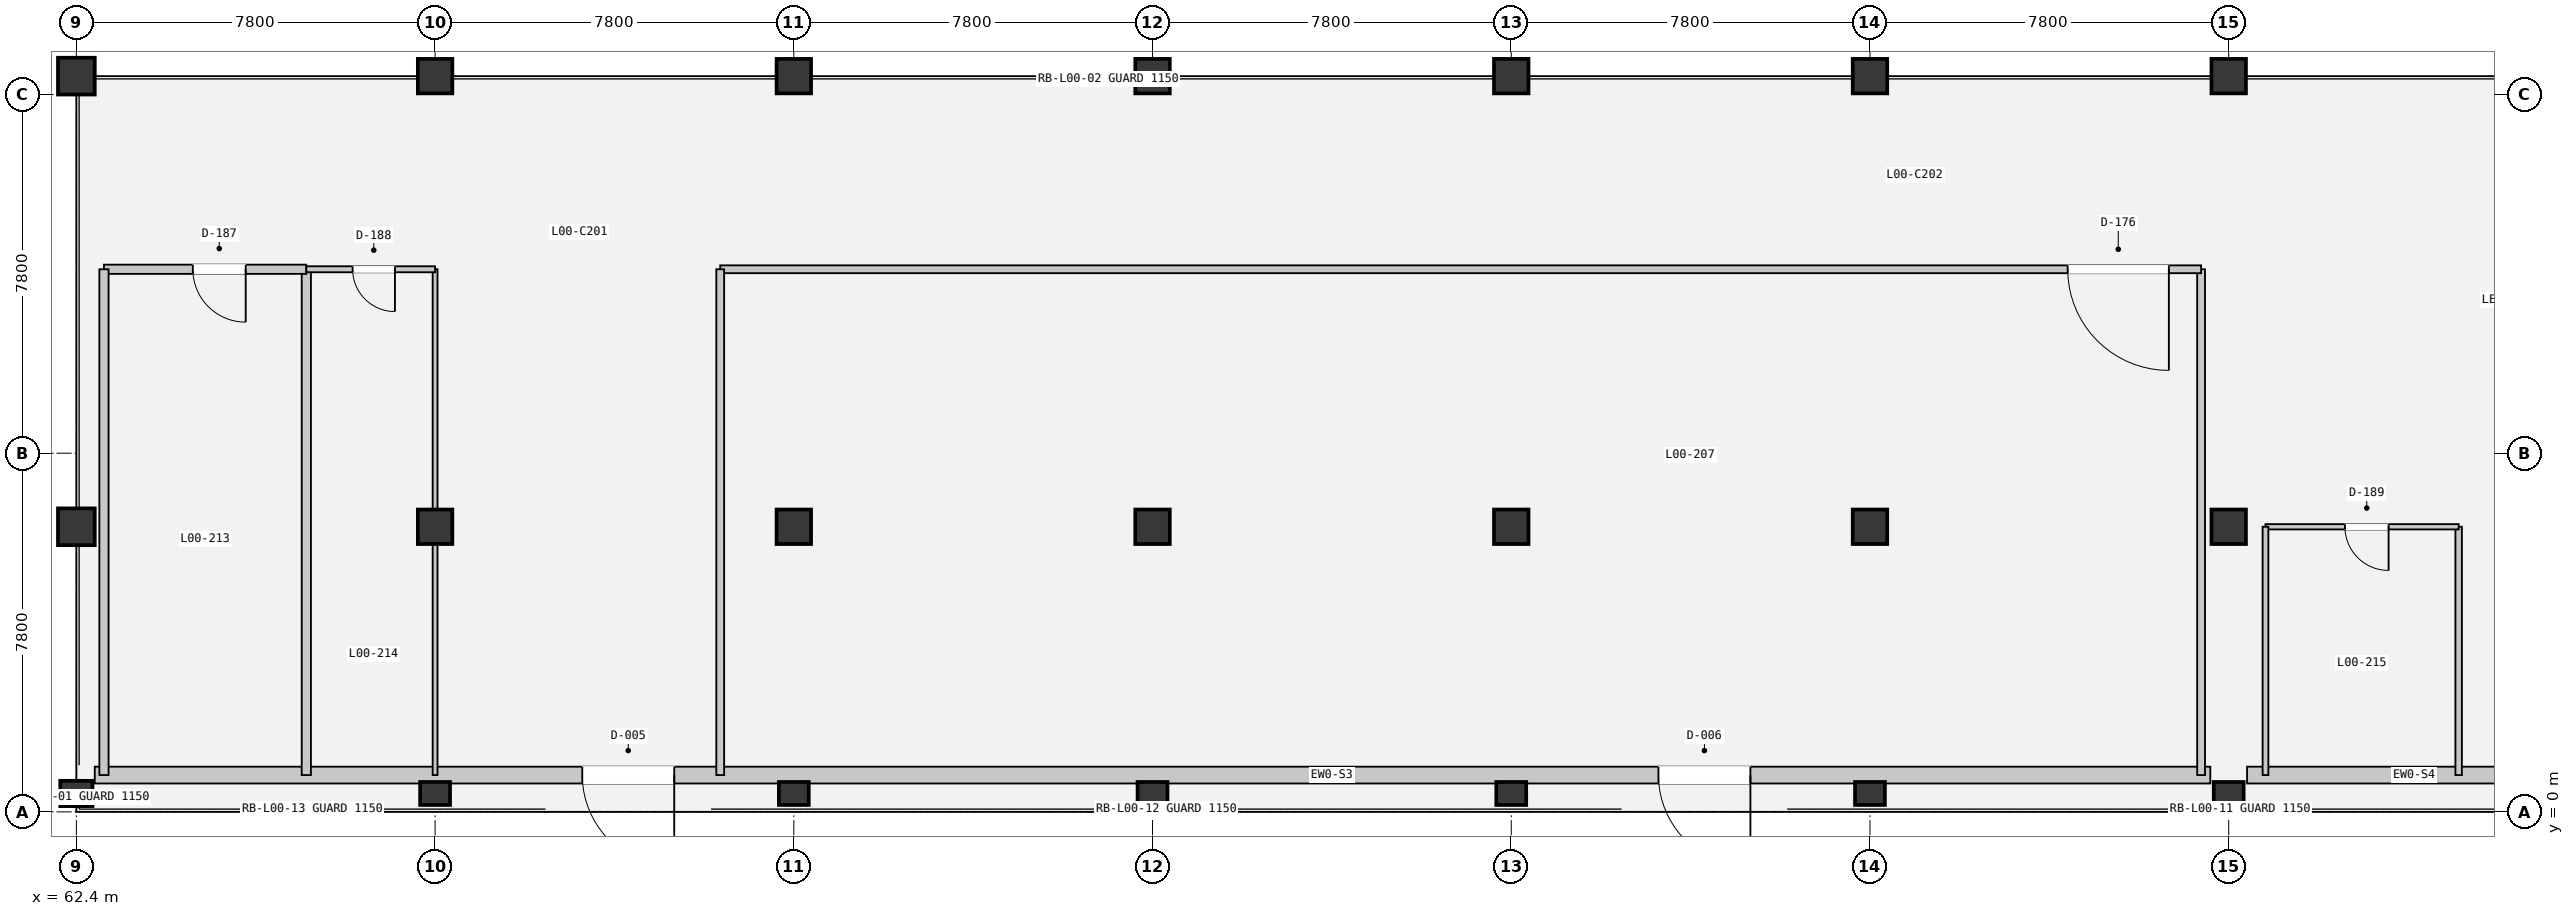
"""IFC4 building model, lengths in metres.
Left out: names, types, materials, properties, quantities, classifications, styles, units other than length and angle.
Written with IfcOpenShell. Run it as: python <this file> out.ifc"""

import sys

from ifc_helpers import new_model, si_unit, direction, frame, frame_2d, origin, origin_2d, place, context, subcontext, project, spatial, rectangle, extrude, element, fill, save


model = new_model("IFC4")
c1 = context("Model", 3, precision=1e-05, world=origin(), true_north=direction((0.0, 1.0)))
c2 = subcontext(c1, "Body", "Model", "MODEL_VIEW")
j1 = project(units=[si_unit("LENGTHUNIT", "METRE"), si_unit("PLANEANGLEUNIT", "RADIAN")], contexts=[c1])
p1 = place(None, origin())
s1 = spatial("IfcSite", under=j1, at=p1, CompositionType="ELEMENT")
p2 = place(p1, origin())
s2 = spatial("IfcBuilding", under=s1, at=p2, CompositionType="ELEMENT")
p3 = place(p2, origin())
s3 = spatial("IfcBuildingStorey", under=s2, at=p3, CompositionType="ELEMENT", Elevation=0.0)
p4 = place(p3, frame((62.4, 0.4, 0.0), z_axis=(0.0, 0.0, 1.0), x_axis=(1.0, 0.0, 0.0)))
e1 = element("IfcColumn", 1, at=p4, inside=s3, PredefinedType="COLUMN", context=c2, shape_type="SweptSolid", body=[
    extrude(rectangle(XDim=0.7, YDim=0.55, at=origin_2d()), origin(), (0.0, 0.0, 1.0), 5.4),
])
for number, where, z_axis, x_axis in (
    (2, (62.4, 6.2, 0.0), (0.0, 0.0, 1.0), (1.0, 0.0, 0.0)),
    (3, (62.4, 16.0, 0.0), (0.0, 0.0, 1.0), (1.0, 0.0, 0.0)),
):
    element("IfcColumn", number, at=place(p3, frame(where, z_axis=z_axis, x_axis=x_axis)), inside=s3, PredefinedType="COLUMN", context=c2, shape_type="SweptSolid", body=[
        extrude(rectangle(XDim=0.8, YDim=0.8, at=origin_2d()), origin(), (0.0, 0.0, 1.0), 5.4),
    ])
p5 = place(p3, frame((70.2, 0.4, 0.0), z_axis=(0.0, 0.0, 1.0), x_axis=(1.0, 0.0, 0.0)))
e4 = element("IfcColumn", 4, at=p5, inside=s3, PredefinedType="COLUMN", context=c2, shape_type="SweptSolid", body=[
    extrude(rectangle(XDim=0.65, YDim=0.5, at=origin_2d()), origin(), (0.0, 0.0, 1.0), 5.4),
])
for number, where, z_axis, x_axis in (
    (5, (70.2, 6.2, 0.0), (0.0, 0.0, 1.0), (1.0, 0.0, 0.0)),
    (6, (70.2, 16.0, 0.0), (0.0, 0.0, 1.0), (1.0, 0.0, 0.0)),
):
    element("IfcColumn", number, at=place(p3, frame(where, z_axis=z_axis, x_axis=x_axis)), inside=s3, PredefinedType="COLUMN", context=c2, shape_type="SweptSolid", body=[
        extrude(rectangle(XDim=0.75, YDim=0.75, at=origin_2d()), origin(), (0.0, 0.0, 1.0), 5.4),
    ])
p6 = place(p3, frame((78.0, 0.4, 0.0), z_axis=(0.0, 0.0, 1.0), x_axis=(1.0, 0.0, 0.0)))
e7 = element("IfcColumn", 7, at=p6, inside=s3, PredefinedType="COLUMN", context=c2, shape_type="SweptSolid", body=[
    extrude(rectangle(XDim=0.65, YDim=0.5, at=origin_2d()), origin(), (0.0, 0.0, 1.0), 5.4),
])
for number, where, z_axis, x_axis in (
    (8, (78.0, 6.2, 0.0), (0.0, 0.0, 1.0), (1.0, 0.0, 0.0)),
    (9, (78.0, 16.0, 0.0), (0.0, 0.0, 1.0), (1.0, 0.0, 0.0)),
):
    element("IfcColumn", number, at=place(p3, frame(where, z_axis=z_axis, x_axis=x_axis)), inside=s3, PredefinedType="COLUMN", context=c2, shape_type="SweptSolid", body=[
        extrude(rectangle(XDim=0.75, YDim=0.75, at=origin_2d()), origin(), (0.0, 0.0, 1.0), 5.4),
    ])
p7 = place(p3, frame((85.8, 0.4, 0.0), z_axis=(0.0, 0.0, 1.0), x_axis=(1.0, 0.0, 0.0)))
e10 = element("IfcColumn", 10, at=p7, inside=s3, PredefinedType="COLUMN", context=c2, shape_type="SweptSolid", body=[
    extrude(rectangle(XDim=0.65, YDim=0.5, at=origin_2d()), origin(), (0.0, 0.0, 1.0), 5.4),
])
for number, where, z_axis, x_axis in (
    (11, (85.8, 6.2, 0.0), (0.0, 0.0, 1.0), (1.0, 0.0, 0.0)),
    (12, (85.8, 16.0, 0.0), (0.0, 0.0, 1.0), (1.0, 0.0, 0.0)),
):
    element("IfcColumn", number, at=place(p3, frame(where, z_axis=z_axis, x_axis=x_axis)), inside=s3, PredefinedType="COLUMN", context=c2, shape_type="SweptSolid", body=[
        extrude(rectangle(XDim=0.75, YDim=0.75, at=origin_2d()), origin(), (0.0, 0.0, 1.0), 5.4),
    ])
p8 = place(p3, frame((93.6, 0.4, 0.0), z_axis=(0.0, 0.0, 1.0), x_axis=(1.0, 0.0, 0.0)))
e13 = element("IfcColumn", 13, at=p8, inside=s3, PredefinedType="COLUMN", context=c2, shape_type="SweptSolid", body=[
    extrude(rectangle(XDim=0.65, YDim=0.5, at=origin_2d()), origin(), (0.0, 0.0, 1.0), 5.4),
])
for number, where, z_axis, x_axis in (
    (14, (93.6, 6.2, 0.0), (0.0, 0.0, 1.0), (1.0, 0.0, 0.0)),
    (15, (93.6, 16.0, 0.0), (0.0, 0.0, 1.0), (1.0, 0.0, 0.0)),
):
    element("IfcColumn", number, at=place(p3, frame(where, z_axis=z_axis, x_axis=x_axis)), inside=s3, PredefinedType="COLUMN", context=c2, shape_type="SweptSolid", body=[
        extrude(rectangle(XDim=0.75, YDim=0.75, at=origin_2d()), origin(), (0.0, 0.0, 1.0), 5.4),
    ])
p9 = place(p3, frame((101.4, 0.4, 0.0), z_axis=(0.0, 0.0, 1.0), x_axis=(1.0, 0.0, 0.0)))
e16 = element("IfcColumn", 16, at=p9, inside=s3, PredefinedType="COLUMN", context=c2, shape_type="SweptSolid", body=[
    extrude(rectangle(XDim=0.65, YDim=0.5, at=origin_2d()), origin(), (0.0, 0.0, 1.0), 5.4),
])
for number, where, z_axis, x_axis in (
    (17, (101.4, 6.2, 0.0), (0.0, 0.0, 1.0), (1.0, 0.0, 0.0)),
    (18, (101.4, 16.0, 0.0), (0.0, 0.0, 1.0), (1.0, 0.0, 0.0)),
):
    element("IfcColumn", number, at=place(p3, frame(where, z_axis=z_axis, x_axis=x_axis)), inside=s3, PredefinedType="COLUMN", context=c2, shape_type="SweptSolid", body=[
        extrude(rectangle(XDim=0.75, YDim=0.75, at=origin_2d()), origin(), (0.0, 0.0, 1.0), 5.4),
    ])
p10 = place(p3, frame((109.2, 0.4, 0.0), z_axis=(0.0, 0.0, 1.0), x_axis=(1.0, 0.0, 0.0)))
e19 = element("IfcColumn", 19, at=p10, inside=s3, PredefinedType="COLUMN", context=c2, shape_type="SweptSolid", body=[
    extrude(rectangle(XDim=0.65, YDim=0.5, at=origin_2d()), origin(), (0.0, 0.0, 1.0), 5.4),
])
for number, where, z_axis, x_axis in (
    (20, (109.2, 6.2, 0.0), (0.0, 0.0, 1.0), (1.0, 0.0, 0.0)),
    (21, (109.2, 16.0, 0.0), (0.0, 0.0, 1.0), (1.0, 0.0, 0.0)),
):
    element("IfcColumn", number, at=place(p3, frame(where, z_axis=z_axis, x_axis=x_axis)), inside=s3, PredefinedType="COLUMN", context=c2, shape_type="SweptSolid", body=[
        extrude(rectangle(XDim=0.75, YDim=0.75, at=origin_2d()), origin(), (0.0, 0.0, 1.0), 5.4),
    ])
p11 = place(p3, frame((108.8, 0.8, 0.0), z_axis=(0.0, 0.0, 1.0), x_axis=(-1.0, 0.0, 0.0)))
e22 = element("IfcWall", 22, at=p11, inside=s3, PredefinedType="SOLIDWALL", context=c2, shape_type="SweptSolid", body=[
    extrude(rectangle(XDim=46.0, YDim=0.365, at=frame_2d((23.0, 0.0))), origin(), (0.0, 0.0, 1.0), 4.46),
])
p12 = place(p11, frame((33.4, 0.0, 0.0)))
e23 = element("IfcOpeningElement", 23, at=p12, cuts=e22, PredefinedType="OPENING", context=c2, shape_type="SweptSolid", body=[
    extrude(rectangle(XDim=2.0, YDim=2.5, at=frame_2d((1.0, 1.25))), frame((0.0, 0.192, 0.0), z_axis=(0.0, -1.0, 0.0), x_axis=(1.0, 0.0, 0.0)), (0.0, 0.0, 1.0), 0.385),
])
p13 = place(p11, frame((10.0, 0.0, 0.0)))
e24 = element("IfcOpeningElement", 24, at=p13, cuts=e22, PredefinedType="OPENING", context=c2, shape_type="SweptSolid", body=[
    extrude(rectangle(XDim=2.0, YDim=2.5, at=frame_2d((1.0, 1.25))), frame((0.0, 0.192, 0.0), z_axis=(0.0, -1.0, 0.0), x_axis=(1.0, 0.0, 0.0)), (0.0, 0.0, 1.0), 0.385),
])
p14 = place(p3, frame((155.6, 0.8, 0.0), z_axis=(0.0, 0.0, 1.0), x_axis=(-1.0, 0.0, 0.0)))
e25 = element("IfcWall", 25, at=p14, inside=s3, PredefinedType="SOLIDWALL", context=c2, shape_type="SweptSolid", body=[
    extrude(rectangle(XDim=46.0, YDim=0.365, at=frame_2d((23.0, 0.0))), origin(), (0.0, 0.0, 1.0), 4.46),
])
p15 = place(p14, frame((33.6, 0.0, 0.0)))
e26 = element("IfcOpeningElement", 26, at=p15, cuts=e25, PredefinedType="OPENING", context=c2, shape_type="SweptSolid", body=[
    extrude(rectangle(XDim=1.8, YDim=2.4, at=frame_2d((0.9, 1.2))), frame((0.0, 0.192, 0.0), z_axis=(0.0, -1.0, 0.0), x_axis=(1.0, 0.0, 0.0)), (0.0, 0.0, 1.0), 0.385),
])
p16 = place(p14, frame((18.3, 0.0, 0.0)))
e27 = element("IfcOpeningElement", 27, at=p16, cuts=e25, PredefinedType="OPENING", context=c2, shape_type="SweptSolid", body=[
    extrude(rectangle(XDim=1.8, YDim=2.4, at=frame_2d((0.9, 1.2))), frame((0.0, 0.192, 0.0), z_axis=(0.0, -1.0, 0.0), x_axis=(1.0, 0.0, 0.0)), (0.0, 0.0, 1.0), 0.385),
])
p17 = place(p3, frame((108.6, 0.8, 0.0), z_axis=(0.0, 0.0, 1.0), x_axis=(0.0, 1.0, 0.0)))
e28 = element("IfcWall", 28, at=p17, inside=s3, PredefinedType="PARTITIONING", context=c2, shape_type="SweptSolid", body=[
    extrude(rectangle(XDim=11.0, YDim=0.17, at=frame_2d((5.5, 0.0))), origin(), (0.0, 0.0, 1.0), 3.45),
])
p18 = place(p3, frame((108.6, 11.8, 0.0), z_axis=(0.0, 0.0, 1.0), x_axis=(-1.0, 0.0, 0.0)))
e29 = element("IfcWall", 29, at=p18, inside=s3, PredefinedType="PARTITIONING", context=c2, shape_type="SweptSolid", body=[
    extrude(rectangle(XDim=32.2, YDim=0.17, at=frame_2d((16.1, 0.0))), origin(), (0.0, 0.0, 1.0), 3.45),
])
p19 = place(p18, frame((0.701, 0.0, 0.0)))
e30 = element("IfcOpeningElement", 30, at=p19, cuts=e29, PredefinedType="OPENING", context=c2, shape_type="SweptSolid", body=[
    extrude(rectangle(XDim=2.2, YDim=2.5, at=frame_2d((1.1, 1.25))), frame((0.0, 0.095, 0.0), z_axis=(0.0, -1.0, 0.0), x_axis=(1.0, 0.0, 0.0)), (0.0, 0.0, 1.0), 0.19),
])
p20 = place(p3, frame((76.4, 11.8, 0.0), z_axis=(0.0, 0.0, 1.0), x_axis=(0.0, -1.0, 0.0)))
e31 = element("IfcWall", 31, at=p20, inside=s3, PredefinedType="PARTITIONING", context=c2, shape_type="SweptSolid", body=[
    extrude(rectangle(XDim=11.0, YDim=0.17, at=frame_2d((5.5, 0.0))), origin(), (0.0, 0.0, 1.0), 3.45),
])
p21 = place(p3, frame((67.4, 0.8, 0.0), z_axis=(0.0, 0.0, 1.0), x_axis=(0.0, 1.0, 0.0)))
e32 = element("IfcWall", 32, at=p21, inside=s3, PredefinedType="PARTITIONING", context=c2, shape_type="SweptSolid", body=[
    extrude(rectangle(XDim=11.0, YDim=0.2, at=frame_2d((5.5, 0.0))), origin(), (0.0, 0.0, 1.0), 3.45),
])
p22 = place(p3, frame((67.4, 11.8, 0.0), z_axis=(0.0, 0.0, 1.0), x_axis=(-1.0, 0.0, 0.0)))
e33 = element("IfcWall", 33, at=p22, inside=s3, PredefinedType="PARTITIONING", context=c2, shape_type="SweptSolid", body=[
    extrude(rectangle(XDim=4.4, YDim=0.2, at=frame_2d((2.2, 0.0))), origin(), (0.0, 0.0, 1.0), 3.45),
])
p23 = place(p22, frame((1.318, 0.0, 0.0)))
e34 = element("IfcOpeningElement", 34, at=p23, cuts=e33, PredefinedType="OPENING", context=c2, shape_type="SweptSolid", body=[
    extrude(rectangle(XDim=1.15, YDim=2.2, at=frame_2d((0.575, 1.1))), frame((0.0, 0.11, 0.0), z_axis=(0.0, -1.0, 0.0), x_axis=(1.0, 0.0, 0.0)), (0.0, 0.0, 1.0), 0.22),
])
p24 = place(p3, frame((63.0, 11.8, 0.0), z_axis=(0.0, 0.0, 1.0), x_axis=(0.0, -1.0, 0.0)))
e35 = element("IfcWall", 35, at=p24, inside=s3, PredefinedType="PARTITIONING", context=c2, shape_type="SweptSolid", body=[
    extrude(rectangle(XDim=11.0, YDim=0.2, at=frame_2d((5.5, 0.0))), origin(), (0.0, 0.0, 1.0), 3.45),
])
p25 = place(p3, frame((70.2, 0.8, 0.0), z_axis=(0.0, 0.0, 1.0), x_axis=(0.0, 1.0, 0.0)))
e36 = element("IfcWall", 36, at=p25, inside=s3, PredefinedType="PARTITIONING", context=c2, shape_type="SweptSolid", body=[
    extrude(rectangle(XDim=11.0, YDim=0.105, at=frame_2d((5.5, 0.0))), origin(), (0.0, 0.0, 1.0), 3.45),
])
p26 = place(p3, frame((70.2, 11.8, 0.0), z_axis=(0.0, 0.0, 1.0), x_axis=(-1.0, 0.0, 0.0)))
e37 = element("IfcWall", 37, at=p26, inside=s3, PredefinedType="PARTITIONING", context=c2, shape_type="SweptSolid", body=[
    extrude(rectangle(XDim=2.8, YDim=0.13, at=frame_2d((1.4, 0.0))), origin(), (0.0, 0.0, 1.0), 3.45),
])
p27 = place(p26, frame((0.873, 0.0, 0.0)))
e38 = element("IfcOpeningElement", 38, at=p27, cuts=e37, PredefinedType="OPENING", context=c2, shape_type="SweptSolid", body=[
    extrude(rectangle(XDim=0.92, YDim=2.1, at=frame_2d((0.46, 1.05))), frame((0.0, 0.075, 0.0), z_axis=(0.0, -1.0, 0.0), x_axis=(1.0, 0.0, 0.0)), (0.0, 0.0, 1.0), 0.15),
])
p28 = place(p3, frame((114.2, 0.8, 0.0), z_axis=(0.0, 0.0, 1.0), x_axis=(0.0, 1.0, 0.0)))
e39 = element("IfcWall", 39, at=p28, inside=s3, PredefinedType="PARTITIONING", context=c2, shape_type="SweptSolid", body=[
    extrude(rectangle(XDim=5.4, YDim=0.14, at=frame_2d((2.7, 0.0))), origin(), (0.0, 0.0, 1.0), 3.45),
])
p29 = place(p3, frame((114.2, 6.2, 0.0), z_axis=(0.0, 0.0, 1.0), x_axis=(-1.0, 0.0, 0.0)))
e40 = element("IfcWall", 40, at=p29, inside=s3, PredefinedType="PARTITIONING", context=c2, shape_type="SweptSolid", body=[
    extrude(rectangle(XDim=4.2, YDim=0.115, at=frame_2d((2.1, 0.0))), origin(), (0.0, 0.0, 1.0), 3.45),
])
p30 = place(p29, frame((1.523, 0.0, 0.0)))
e41 = element("IfcOpeningElement", 41, at=p30, cuts=e40, PredefinedType="OPENING", context=c2, shape_type="SweptSolid", body=[
    extrude(rectangle(XDim=0.95, YDim=2.1, at=frame_2d((0.475, 1.05))), frame((0.0, 0.067, 0.0), z_axis=(0.0, -1.0, 0.0), x_axis=(1.0, 0.0, 0.0)), (0.0, 0.0, 1.0), 0.135),
])
p31 = place(p3, frame((110.0, 6.2, 0.0), z_axis=(0.0, 0.0, 1.0), x_axis=(0.0, -1.0, 0.0)))
e42 = element("IfcWall", 42, at=p31, inside=s3, PredefinedType="PARTITIONING", context=c2, shape_type="SweptSolid", body=[
    extrude(rectangle(XDim=5.4, YDim=0.125, at=frame_2d((2.7, 0.0))), origin(), (0.0, 0.0, 1.0), 3.45),
])
p32 = place(p12, origin())
e43 = element("IfcDoor", 43, at=p32, inside=s3, OperationType="DOUBLE_DOOR_SINGLE_SWING", PredefinedType="DOOR", context=c2, shape_type="SweptSolid", body=[
    extrude(rectangle(XDim=2.0, YDim=2.5, at=frame_2d((1.0, 1.25))), frame((0.0, 0.025, 0.0), z_axis=(0.0, -1.0, 0.0), x_axis=(1.0, 0.0, 0.0)), (0.0, 0.0, 1.0), 0.05),
])
fill(e23, e43)
p33 = place(p13, origin())
e44 = element("IfcDoor", 44, at=p33, inside=s3, OperationType="DOUBLE_DOOR_SINGLE_SWING", PredefinedType="DOOR", context=c2, shape_type="SweptSolid", body=[
    extrude(rectangle(XDim=2.0, YDim=2.5, at=frame_2d((1.0, 1.25))), frame((0.0, 0.025, 0.0), z_axis=(0.0, -1.0, 0.0), x_axis=(1.0, 0.0, 0.0)), (0.0, 0.0, 1.0), 0.05),
])
fill(e24, e44)
p34 = place(p19, origin())
e45 = element("IfcDoor", 45, at=p34, inside=s3, OperationType="DOUBLE_DOOR_SINGLE_SWING", PredefinedType="DOOR", context=c2, shape_type="SweptSolid", body=[
    extrude(rectangle(XDim=2.2, YDim=2.5, at=frame_2d((1.1, 1.25))), frame((0.0, 0.025, 0.0), z_axis=(0.0, -1.0, 0.0), x_axis=(1.0, 0.0, 0.0)), (0.0, 0.0, 1.0), 0.05),
])
fill(e30, e45)
p35 = place(p23, origin())
e46 = element("IfcDoor", 46, at=p35, inside=s3, OperationType="SINGLE_SWING_RIGHT", PredefinedType="DOOR", context=c2, shape_type="SweptSolid", body=[
    extrude(rectangle(XDim=1.15, YDim=2.2, at=frame_2d((0.575, 1.1))), frame((0.0, 0.025, 0.0), z_axis=(0.0, -1.0, 0.0), x_axis=(1.0, 0.0, 0.0)), (0.0, 0.0, 1.0), 0.05),
])
fill(e34, e46)
p36 = place(p27, origin())
e47 = element("IfcDoor", 47, at=p36, inside=s3, OperationType="SINGLE_SWING_LEFT", PredefinedType="DOOR", context=c2, shape_type="SweptSolid", body=[
    extrude(rectangle(XDim=0.92, YDim=2.1, at=frame_2d((0.46, 1.05))), frame((0.0, 0.025, 0.0), z_axis=(0.0, -1.0, 0.0), x_axis=(1.0, 0.0, 0.0)), (0.0, 0.0, 1.0), 0.05),
])
fill(e38, e47)
p37 = place(p30, origin())
e48 = element("IfcDoor", 48, at=p37, inside=s3, OperationType="SINGLE_SWING_RIGHT", PredefinedType="DOOR", context=c2, shape_type="SweptSolid", body=[
    extrude(rectangle(XDim=0.95, YDim=2.1, at=frame_2d((0.475, 1.05))), frame((0.0, 0.025, 0.0), z_axis=(0.0, -1.0, 0.0), x_axis=(1.0, 0.0, 0.0)), (0.0, 0.0, 1.0), 0.05),
])
fill(e41, e48)
save(model, sys.argv[1])
